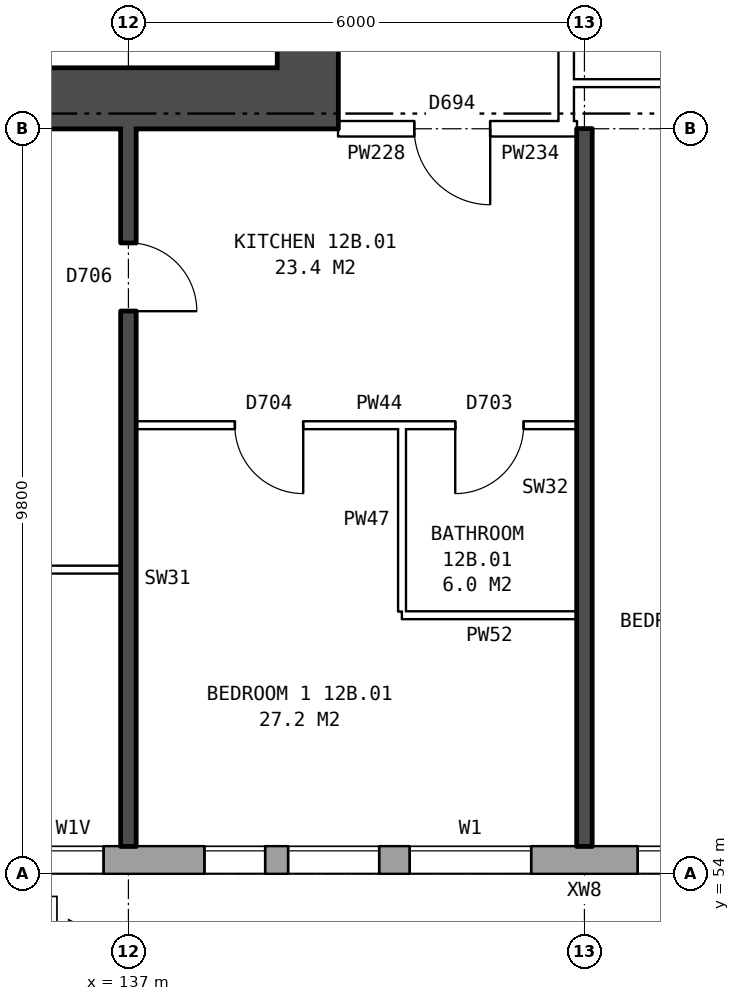
"""IFC4 building model, lengths in metres.
Left out: names, types, materials, properties, quantities, classifications, styles, units other than length and angle.
Written with IfcOpenShell. Run it as: python <this file> out.ifc"""

import sys

from ifc_helpers import new_model, si_unit, direction, frame, frame_2d, origin, place, context, subcontext, project, spatial, rectangle, extrude, element, fill, save


model = new_model("IFC4")
c1 = context("Model", 3, precision=1e-05, world=origin(), true_north=direction((0.0, 1.0)))
c2 = subcontext(c1, "Body", "Model", "MODEL_VIEW")
j1 = project(units=[si_unit("LENGTHUNIT", "METRE"), si_unit("PLANEANGLEUNIT", "RADIAN")], contexts=[c1])
p1 = place(None, origin())
s1 = spatial("IfcSite", under=j1, at=p1, CompositionType="ELEMENT")
p2 = place(p1, origin())
s2 = spatial("IfcBuilding", under=s1, at=p2, CompositionType="ELEMENT")
p3 = place(p2, frame((0.0, 0.0, 47.4)))
s3 = spatial("IfcBuildingStorey", under=s2, at=p3, CompositionType="ELEMENT", Elevation=47.4)
p4 = place(p3, frame((134.075, 54.18, 0.0), z_axis=(0.0, 0.0, 1.0), x_axis=(1.0, 0.0, 0.0)))
e1 = element("IfcWall", 1, at=p4, inside=s3, PredefinedType="STANDARD", context=c2, shape_type="SweptSolid", body=[
    extrude(rectangle(XDim=39.351, YDim=0.36, at=frame_2d((19.675, 0.0))), origin(), (0.0, 0.0, 1.0), 2.85),
])
p5 = place(p4, frame((0.3, 0.0, 0.8)))
e2 = element("IfcOpeningElement", 2, at=p5, cuts=e1, PredefinedType="OPENING", context=c2, shape_type="SweptSolid", body=[
    extrude(rectangle(XDim=1.2, YDim=1.8, at=frame_2d((0.6, 0.9))), frame((0.0, 0.19, 0.0), z_axis=(0.0, -1.0, 0.0), x_axis=(1.0, 0.0, 0.0)), (0.0, 0.0, 1.0), 0.38),
])
p6 = place(p4, frame((3.925, 0.0, 0.8)))
e3 = element("IfcOpeningElement", 3, at=p6, cuts=e1, PredefinedType="OPENING", context=c2, shape_type="SweptSolid", body=[
    extrude(rectangle(XDim=0.8, YDim=0.9, at=frame_2d((0.4, 0.45))), frame((0.0, 0.19, 0.0), z_axis=(0.0, -1.0, 0.0), x_axis=(1.0, 0.0, 0.0)), (0.0, 0.0, 1.0), 0.38),
])
p7 = place(p4, frame((6.625, 0.0, 0.8)))
e4 = element("IfcOpeningElement", 4, at=p7, cuts=e1, PredefinedType="OPENING", context=c2, shape_type="SweptSolid", body=[
    extrude(rectangle(XDim=1.6, YDim=1.8, at=frame_2d((0.8, 0.9))), frame((0.0, 0.19, 0.0), z_axis=(0.0, -1.0, 0.0), x_axis=(1.0, 0.0, 0.0)), (0.0, 0.0, 1.0), 0.38),
])
p8 = place(p4, frame((9.625, 0.0, 0.8)))
e5 = element("IfcOpeningElement", 5, at=p8, cuts=e1, PredefinedType="OPENING", context=c2, shape_type="SweptSolid", body=[
    extrude(rectangle(XDim=1.6, YDim=1.8, at=frame_2d((0.8, 0.9))), frame((0.0, 0.19, 0.0), z_axis=(0.0, -1.0, 0.0), x_axis=(1.0, 0.0, 0.0)), (0.0, 0.0, 1.0), 0.38),
])
p9 = place(p4, frame((12.625, 0.0, 0.8)))
e6 = element("IfcOpeningElement", 6, at=p9, cuts=e1, PredefinedType="OPENING", context=c2, shape_type="SweptSolid", body=[
    extrude(rectangle(XDim=1.6, YDim=1.8, at=frame_2d((0.8, 0.9))), frame((0.0, 0.19, 0.0), z_axis=(0.0, -1.0, 0.0), x_axis=(1.0, 0.0, 0.0)), (0.0, 0.0, 1.0), 0.38),
])
p10 = place(p4, frame((15.625, 0.0, 0.8)))
e7 = element("IfcOpeningElement", 7, at=p10, cuts=e1, PredefinedType="OPENING", context=c2, shape_type="SweptSolid", body=[
    extrude(rectangle(XDim=1.6, YDim=1.8, at=frame_2d((0.8, 0.9))), frame((0.0, 0.19, 0.0), z_axis=(0.0, -1.0, 0.0), x_axis=(1.0, 0.0, 0.0)), (0.0, 0.0, 1.0), 0.38),
])
p11 = place(p4, frame((18.625, 0.0, 0.8)))
e8 = element("IfcOpeningElement", 8, at=p11, cuts=e1, PredefinedType="OPENING", context=c2, shape_type="SweptSolid", body=[
    extrude(rectangle(XDim=1.6, YDim=1.8, at=frame_2d((0.8, 0.9))), frame((0.0, 0.19, 0.0), z_axis=(0.0, -1.0, 0.0), x_axis=(1.0, 0.0, 0.0)), (0.0, 0.0, 1.0), 0.38),
])
p12 = place(p4, frame((21.625, 0.0, 0.8)))
e9 = element("IfcOpeningElement", 9, at=p12, cuts=e1, PredefinedType="OPENING", context=c2, shape_type="SweptSolid", body=[
    extrude(rectangle(XDim=1.6, YDim=1.8, at=frame_2d((0.8, 0.9))), frame((0.0, 0.19, 0.0), z_axis=(0.0, -1.0, 0.0), x_axis=(1.0, 0.0, 0.0)), (0.0, 0.0, 1.0), 0.38),
])
p13 = place(p4, frame((24.625, 0.0, 0.8)))
e10 = element("IfcOpeningElement", 10, at=p13, cuts=e1, PredefinedType="OPENING", context=c2, shape_type="SweptSolid", body=[
    extrude(rectangle(XDim=1.6, YDim=1.8, at=frame_2d((0.8, 0.9))), frame((0.0, 0.19, 0.0), z_axis=(0.0, -1.0, 0.0), x_axis=(1.0, 0.0, 0.0)), (0.0, 0.0, 1.0), 0.38),
])
p14 = place(p4, frame((27.625, 0.0, 0.8)))
e11 = element("IfcOpeningElement", 11, at=p14, cuts=e1, PredefinedType="OPENING", context=c2, shape_type="SweptSolid", body=[
    extrude(rectangle(XDim=1.6, YDim=1.8, at=frame_2d((0.8, 0.9))), frame((0.0, 0.19, 0.0), z_axis=(0.0, -1.0, 0.0), x_axis=(1.0, 0.0, 0.0)), (0.0, 0.0, 1.0), 0.38),
])
p15 = place(p4, frame((30.625, 0.0, 0.8)))
e12 = element("IfcOpeningElement", 12, at=p15, cuts=e1, PredefinedType="OPENING", context=c2, shape_type="SweptSolid", body=[
    extrude(rectangle(XDim=1.6, YDim=1.8, at=frame_2d((0.8, 0.9))), frame((0.0, 0.19, 0.0), z_axis=(0.0, -1.0, 0.0), x_axis=(1.0, 0.0, 0.0)), (0.0, 0.0, 1.0), 0.38),
])
p16 = place(p4, frame((33.125, 0.0, 0.8)))
e13 = element("IfcOpeningElement", 13, at=p16, cuts=e1, PredefinedType="OPENING", context=c2, shape_type="SweptSolid", body=[
    extrude(rectangle(XDim=1.2, YDim=1.8, at=frame_2d((0.6, 0.9))), frame((0.0, 0.19, 0.0), z_axis=(0.0, -1.0, 0.0), x_axis=(1.0, 0.0, 0.0)), (0.0, 0.0, 1.0), 0.38),
])
p17 = place(p4, frame((34.625, 0.0, 0.8)))
e14 = element("IfcOpeningElement", 14, at=p17, cuts=e1, PredefinedType="OPENING", context=c2, shape_type="SweptSolid", body=[
    extrude(rectangle(XDim=0.8, YDim=0.9, at=frame_2d((0.4, 0.45))), frame((0.0, 0.19, 0.0), z_axis=(0.0, -1.0, 0.0), x_axis=(1.0, 0.0, 0.0)), (0.0, 0.0, 1.0), 0.38),
])
p18 = place(p4, frame((1.8, 0.0, 1.6)))
e15 = element("IfcOpeningElement", 15, at=p18, cuts=e1, PredefinedType="OPENING", context=c2, shape_type="SweptSolid", body=[
    extrude(rectangle(XDim=0.8, YDim=0.9, at=frame_2d((0.4, 0.45))), frame((0.0, 0.19, 0.0), z_axis=(0.0, -1.0, 0.0), x_axis=(1.0, 0.0, 0.0)), (0.0, 0.0, 1.0), 0.38),
])
p19 = place(p4, frame((5.025, 0.0, 0.8)))
e16 = element("IfcOpeningElement", 16, at=p19, cuts=e1, PredefinedType="OPENING", context=c2, shape_type="SweptSolid", body=[
    extrude(rectangle(XDim=1.2, YDim=1.8, at=frame_2d((0.6, 0.9))), frame((0.0, 0.19, 0.0), z_axis=(0.0, -1.0, 0.0), x_axis=(1.0, 0.0, 0.0)), (0.0, 0.0, 1.0), 0.38),
])
p20 = place(p4, frame((36.625, 0.0, 1.7)))
e17 = element("IfcOpeningElement", 17, at=p20, cuts=e1, PredefinedType="OPENING", context=c2, shape_type="SweptSolid", body=[
    extrude(rectangle(XDim=0.8, YDim=0.9, at=frame_2d((0.4, 0.45))), frame((0.0, 0.19, 0.0), z_axis=(0.0, -1.0, 0.0), x_axis=(1.0, 0.0, 0.0)), (0.0, 0.0, 1.0), 0.38),
])
p21 = place(p4, frame((37.725, 0.0, 0.8)))
e18 = element("IfcOpeningElement", 18, at=p21, cuts=e1, PredefinedType="OPENING", context=c2, shape_type="SweptSolid", body=[
    extrude(rectangle(XDim=1.0, YDim=1.8, at=frame_2d((0.5, 0.9))), frame((0.0, 0.19, 0.0), z_axis=(0.0, -1.0, 0.0), x_axis=(1.0, 0.0, 0.0)), (0.0, 0.0, 1.0), 0.38),
])
p22 = place(p3, frame((139.36, 64.6, 0.0), z_axis=(0.0, 0.0, 1.0), x_axis=(0.0, 1.0, 0.0)))
e19 = element("IfcWall", 19, at=p22, inside=s3, PredefinedType="SHEAR", context=c2, shape_type="SweptSolid", body=[
    extrude(rectangle(XDim=10.8, YDim=0.8, at=frame_2d((5.4, 0.0))), origin(), (0.0, 0.0, 1.0), 2.85),
])
p23 = place(p22, frame((0.525, 0.0, 0.0)))
e20 = element("IfcOpeningElement", 20, at=p23, cuts=e19, PredefinedType="OPENING", context=c2, shape_type="SweptSolid", body=[
    extrude(rectangle(XDim=1.1, YDim=2.1, at=frame_2d((0.55, 1.05))), frame((0.0, 0.41, 0.0), z_axis=(0.0, -1.0, 0.0), x_axis=(1.0, 0.0, 0.0)), (0.0, 0.0, 1.0), 0.82),
])
p24 = place(p22, frame((9.1, 0.0, 0.0)))
e21 = element("IfcOpeningElement", 21, at=p24, cuts=e19, PredefinedType="OPENING", context=c2, shape_type="SweptSolid", body=[
    extrude(rectangle(XDim=1.1, YDim=2.1, at=frame_2d((0.55, 1.05))), frame((0.0, 0.41, 0.0), z_axis=(0.0, -1.0, 0.0), x_axis=(1.0, 0.0, 0.0)), (0.0, 0.0, 1.0), 0.82),
])
p25 = place(p22, frame((7.325, 0.0, 0.0)))
e22 = element("IfcOpeningElement", 22, at=p25, cuts=e19, PredefinedType="OPENING", context=c2, shape_type="SweptSolid", body=[
    extrude(rectangle(XDim=0.85, YDim=2.1, at=frame_2d((0.425, 1.05))), frame((0.0, 0.41, 0.0), z_axis=(0.0, -1.0, 0.0), x_axis=(1.0, 0.0, 0.0)), (0.0, 0.0, 1.0), 0.82),
])
p26 = place(p3, frame((139.76, 64.2, 0.0), z_axis=(0.0, 0.0, 1.0), x_axis=(-1.0, 0.0, 0.0)))
e23 = element("IfcWall", 23, at=p26, inside=s3, PredefinedType="SHEAR", context=c2, shape_type="SweptSolid", body=[
    extrude(rectangle(XDim=8.4, YDim=0.8, at=frame_2d((4.2, 0.0))), origin(), (0.0, 0.0, 1.0), 2.85),
])
p27 = place(p3, frame((142.76, 63.9, 0.0), z_axis=(0.0, 0.0, 1.0), x_axis=(0.0, 1.0, 0.0)))
e24 = element("IfcWall", 24, at=p27, inside=s3, PredefinedType="PARTITIONING", context=c2, shape_type="SweptSolid", body=[
    extrude(rectangle(XDim=12.2, YDim=0.2, at=frame_2d((6.1, 0.0))), origin(), (0.0, 0.0, 1.0), 2.85),
])
p28 = place(p27, frame((5.1, 0.0, 0.0)))
e25 = element("IfcOpeningElement", 25, at=p28, cuts=e24, PredefinedType="OPENING", context=c2, shape_type="SweptSolid", body=[
    extrude(rectangle(XDim=2.0, YDim=2.1, at=frame_2d((1.0, 1.05))), frame((0.0, 0.11, 0.0), z_axis=(0.0, -1.0, 0.0), x_axis=(1.0, 0.0, 0.0)), (0.0, 0.0, 1.0), 0.22),
])
p29 = place(p3, frame((140.6, 57.4, 0.0), z_axis=(0.0, 0.0, 1.0), x_axis=(1.0, 0.0, 0.0)))
e26 = element("IfcWall", 26, at=p29, inside=s3, PredefinedType="PARTITIONING", context=c2, shape_type="SweptSolid", body=[
    extrude(rectangle(XDim=2.3, YDim=0.1, at=frame_2d((1.15, 0.0))), origin(), (0.0, 0.0, 1.0), 2.85),
])
p30 = place(p3, frame((131.36, 58.0, 0.0), z_axis=(0.0, 0.0, 1.0), x_axis=(1.0, 0.0, 0.0)))
e27 = element("IfcWall", 27, at=p30, inside=s3, PredefinedType="PARTITIONING", context=c2, shape_type="SweptSolid", body=[
    extrude(rectangle(XDim=5.54, YDim=0.1, at=frame_2d((2.77, 0.0))), origin(), (0.0, 0.0, 1.0), 2.85),
])
p31 = place(p30, frame((2.32, 0.0, 0.0)))
e28 = element("IfcOpeningElement", 28, at=p31, cuts=e27, PredefinedType="OPENING", context=c2, shape_type="SweptSolid", body=[
    extrude(rectangle(XDim=0.9, YDim=2.1, at=frame_2d((0.45, 1.05))), frame((0.0, 0.06, 0.0), z_axis=(0.0, -1.0, 0.0), x_axis=(1.0, 0.0, 0.0)), (0.0, 0.0, 1.0), 0.12),
])
p32 = place(p3, frame((137.1, 59.9, 0.0), z_axis=(0.0, 0.0, 1.0), x_axis=(1.0, 0.0, 0.0)))
e29 = element("IfcWall", 29, at=p32, inside=s3, PredefinedType="PARTITIONING", context=c2, shape_type="SweptSolid", body=[
    extrude(rectangle(XDim=5.8, YDim=0.1, at=frame_2d((2.9, 0.0))), origin(), (0.0, 0.0, 1.0), 2.85),
])
p33 = place(p32, frame((1.3, 0.0, 0.0)))
e30 = element("IfcOpeningElement", 30, at=p33, cuts=e29, PredefinedType="OPENING", context=c2, shape_type="SweptSolid", body=[
    extrude(rectangle(XDim=0.9, YDim=2.1, at=frame_2d((0.45, 1.05))), frame((0.0, 0.06, 0.0), z_axis=(0.0, -1.0, 0.0), x_axis=(1.0, 0.0, 0.0)), (0.0, 0.0, 1.0), 0.12),
])
p34 = place(p32, frame((4.2, 0.0, 0.0)))
e31 = element("IfcOpeningElement", 31, at=p34, cuts=e29, PredefinedType="OPENING", context=c2, shape_type="SweptSolid", body=[
    extrude(rectangle(XDim=0.9, YDim=2.1, at=frame_2d((0.45, 1.05))), frame((0.0, 0.06, 0.0), z_axis=(0.0, -1.0, 0.0), x_axis=(1.0, 0.0, 0.0)), (0.0, 0.0, 1.0), 0.12),
])
p35 = place(p3, frame((139.76, 63.8, 0.0), z_axis=(0.0, 0.0, 1.0), x_axis=(1.0, 0.0, 0.0)))
e32 = element("IfcWall", 32, at=p35, inside=s3, PredefinedType="PARTITIONING", context=c2, shape_type="SweptSolid", body=[
    extrude(rectangle(XDim=3.0, YDim=0.2, at=frame_2d((1.5, 0.0))), origin(), (0.0, 0.0, 1.0), 2.85),
])
p36 = place(p35, frame((1.0, 0.0, 0.0)))
e33 = element("IfcOpeningElement", 33, at=p36, cuts=e32, PredefinedType="OPENING", context=c2, shape_type="SweptSolid", body=[
    extrude(rectangle(XDim=1.0, YDim=2.1, at=frame_2d((0.5, 1.05))), frame((0.0, 0.11, 0.0), z_axis=(0.0, -1.0, 0.0), x_axis=(1.0, 0.0, 0.0)), (0.0, 0.0, 1.0), 0.22),
])
p37 = place(p3, frame((142.76, 63.8, 0.0), z_axis=(0.0, 0.0, 1.0), x_axis=(1.0, 0.0, 0.0)))
e34 = element("IfcWall", 34, at=p37, inside=s3, PredefinedType="PARTITIONING", context=c2, shape_type="SweptSolid", body=[
    extrude(rectangle(XDim=0.14, YDim=0.2, at=frame_2d((0.07, 0.0))), origin(), (0.0, 0.0, 1.0), 2.85),
])
p38 = place(p3, frame((142.76, 64.4, 0.0), z_axis=(0.0, 0.0, 1.0), x_axis=(1.0, 0.0, 0.0)))
e35 = element("IfcWall", 35, at=p38, inside=s3, PredefinedType="PARTITIONING", context=c2, shape_type="SweptSolid", body=[
    extrude(rectangle(XDim=3.24, YDim=0.1, at=frame_2d((1.62, 0.0))), origin(), (0.0, 0.0, 1.0), 2.85),
])
p39 = place(p3, frame((137.0, 54.36, 0.0), z_axis=(0.0, 0.0, 1.0), x_axis=(0.0, 1.0, 0.0)))
e36 = element("IfcWall", 36, at=p39, inside=s3, PredefinedType="SOLIDWALL", context=c2, shape_type="SweptSolid", body=[
    extrude(rectangle(XDim=9.44, YDim=0.2, at=frame_2d((4.72, 0.0))), origin(), (0.0, 0.0, 1.0), 2.85),
])
p40 = place(p39, frame((7.04, 0.0, 0.0)))
e37 = element("IfcOpeningElement", 37, at=p40, cuts=e36, PredefinedType="OPENING", context=c2, shape_type="SweptSolid", body=[
    extrude(rectangle(XDim=0.9, YDim=2.1, at=frame_2d((0.45, 1.05))), frame((0.0, 0.11, 0.0), z_axis=(0.0, -1.0, 0.0), x_axis=(1.0, 0.0, 0.0)), (0.0, 0.0, 1.0), 0.22),
])
p41 = place(p3, frame((140.6, 57.45, 0.0), z_axis=(0.0, 0.0, 1.0), x_axis=(0.0, 1.0, 0.0)))
e38 = element("IfcWall", 38, at=p41, inside=s3, PredefinedType="PARTITIONING", context=c2, shape_type="SweptSolid", body=[
    extrude(rectangle(XDim=2.4, YDim=0.1, at=frame_2d((1.2, 0.0))), origin(), (0.0, 0.0, 1.0), 2.85),
])
p42 = place(p3, frame((143.0, 54.36, 0.0), z_axis=(0.0, 0.0, 1.0), x_axis=(0.0, 1.0, 0.0)))
e39 = element("IfcWall", 39, at=p42, inside=s3, PredefinedType="SOLIDWALL", context=c2, shape_type="SweptSolid", body=[
    extrude(rectangle(XDim=9.44, YDim=0.2, at=frame_2d((4.72, 0.0))), origin(), (0.0, 0.0, 1.0), 2.85),
])
p43 = place(p6, origin())
e40 = element("IfcWindow", 40, at=p43, inside=s3, PartitioningType="SINGLE_PANEL", PredefinedType="WINDOW", context=c2, shape_type="SweptSolid", body=[
    extrude(rectangle(XDim=0.8, YDim=0.9, at=frame_2d((0.4, 0.45))), frame((0.0, 0.15, 0.0), z_axis=(0.0, -1.0, 0.0), x_axis=(1.0, 0.0, 0.0)), (0.0, 0.0, 1.0), 0.06),
])
fill(e3, e40)
p44 = place(p7, origin())
e41 = element("IfcWindow", 41, at=p44, inside=s3, PartitioningType="SINGLE_PANEL", PredefinedType="WINDOW", context=c2, shape_type="SweptSolid", body=[
    extrude(rectangle(XDim=1.6, YDim=1.8, at=frame_2d((0.8, 0.9))), frame((0.0, 0.15, 0.0), z_axis=(0.0, -1.0, 0.0), x_axis=(1.0, 0.0, 0.0)), (0.0, 0.0, 1.0), 0.06),
])
fill(e4, e41)
p45 = place(p8, origin())
e42 = element("IfcWindow", 42, at=p45, inside=s3, PartitioningType="SINGLE_PANEL", PredefinedType="WINDOW", context=c2, shape_type="SweptSolid", body=[
    extrude(rectangle(XDim=1.6, YDim=1.8, at=frame_2d((0.8, 0.9))), frame((0.0, 0.15, 0.0), z_axis=(0.0, -1.0, 0.0), x_axis=(1.0, 0.0, 0.0)), (0.0, 0.0, 1.0), 0.06),
])
fill(e5, e42)
p46 = place(p33, frame((0.9, 0.0, 0.0), z_axis=(0.0, 0.0, 1.0), x_axis=(-1.0, 0.0, 0.0)))
e43 = element("IfcDoor", 43, at=p46, inside=s3, OperationType="SINGLE_SWING_LEFT", PredefinedType="DOOR", context=c2, shape_type="SweptSolid", body=[
    extrude(rectangle(XDim=0.9, YDim=2.1, at=frame_2d((0.45, 1.05))), frame((0.0, 0.025, 0.0), z_axis=(0.0, -1.0, 0.0), x_axis=(1.0, 0.0, 0.0)), (0.0, 0.0, 1.0), 0.05),
])
fill(e30, e43)
p47 = place(p36, frame((1.0, 0.0, 0.0), z_axis=(0.0, 0.0, 1.0), x_axis=(-1.0, 0.0, 0.0)))
e44 = element("IfcDoor", 44, at=p47, inside=s3, OperationType="SINGLE_SWING_LEFT", PredefinedType="DOOR", context=c2, shape_type="SweptSolid", body=[
    extrude(rectangle(XDim=1.0, YDim=2.1, at=frame_2d((0.5, 1.05))), frame((0.0, 0.025, 0.0), z_axis=(0.0, -1.0, 0.0), x_axis=(1.0, 0.0, 0.0)), (0.0, 0.0, 1.0), 0.05),
])
fill(e33, e44)
p48 = place(p40, frame((0.9, 0.0, 0.0), z_axis=(0.0, 0.0, 1.0), x_axis=(-1.0, 0.0, 0.0)))
e45 = element("IfcDoor", 45, at=p48, inside=s3, OperationType="SINGLE_SWING_RIGHT", PredefinedType="DOOR", context=c2, shape_type="SweptSolid", body=[
    extrude(rectangle(XDim=0.9, YDim=2.1, at=frame_2d((0.45, 1.05))), frame((0.0, 0.025, 0.0), z_axis=(0.0, -1.0, 0.0), x_axis=(1.0, 0.0, 0.0)), (0.0, 0.0, 1.0), 0.05),
])
fill(e37, e45)
p49 = place(p34, frame((0.9, 0.0, 0.0), z_axis=(0.0, 0.0, 1.0), x_axis=(-1.0, 0.0, 0.0)))
e46 = element("IfcDoor", 46, at=p49, inside=s3, OperationType="SINGLE_SWING_RIGHT", PredefinedType="DOOR", context=c2, shape_type="SweptSolid", body=[
    extrude(rectangle(XDim=0.9, YDim=2.1, at=frame_2d((0.45, 1.05))), frame((0.0, 0.025, 0.0), z_axis=(0.0, -1.0, 0.0), x_axis=(1.0, 0.0, 0.0)), (0.0, 0.0, 1.0), 0.05),
])
fill(e31, e46)
p50 = place(p18, origin())
e47 = element("IfcWindow", 47, at=p50, inside=s3, PartitioningType="SINGLE_PANEL", PredefinedType="WINDOW", context=c2, shape_type="SweptSolid", body=[
    extrude(rectangle(XDim=0.8, YDim=0.9, at=frame_2d((0.4, 0.45))), frame((0.0, 0.15, 0.0), z_axis=(0.0, -1.0, 0.0), x_axis=(1.0, 0.0, 0.0)), (0.0, 0.0, 1.0), 0.06),
])
fill(e15, e47)
p51 = place(p19, origin())
e48 = element("IfcWindow", 48, at=p51, inside=s3, PartitioningType="SINGLE_PANEL", PredefinedType="WINDOW", context=c2, shape_type="SweptSolid", body=[
    extrude(rectangle(XDim=1.2, YDim=1.8, at=frame_2d((0.6, 0.9))), frame((0.0, 0.15, 0.0), z_axis=(0.0, -1.0, 0.0), x_axis=(1.0, 0.0, 0.0)), (0.0, 0.0, 1.0), 0.06),
])
fill(e16, e48)
save(model, sys.argv[1])
